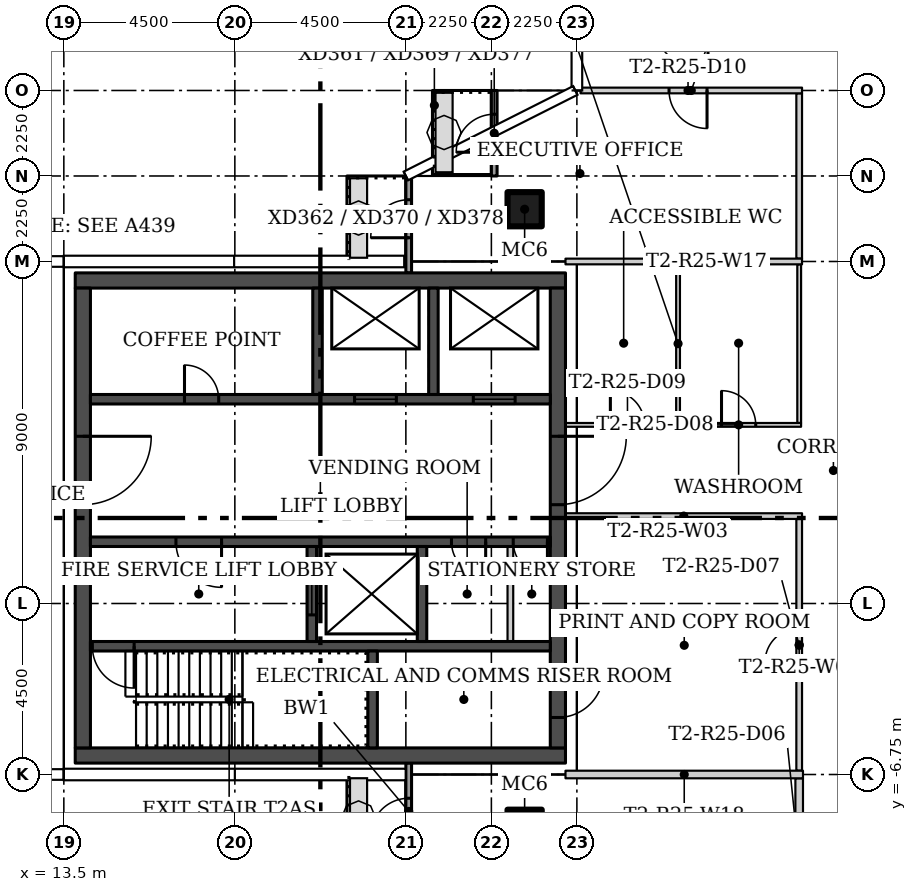
"""IFC4 building model, lengths in metres.
Left out: names, types, materials, properties, quantities, classifications, styles, units other than length and angle.
Written with IfcOpenShell. Run it as: python <this file> out.ifc"""

import sys

from ifc_helpers import new_model, si_unit, direction, frame, frame_2d, origin, origin_2d, place, context, subcontext, project, spatial, rectangle, hollow_rectangle, extrude, element, fill, save


model = new_model("IFC4")
c1 = context("Model", 3, precision=1e-05, world=origin(), true_north=direction((0.0, 1.0)))
c2 = subcontext(c1, "Body", "Model", "MODEL_VIEW")
j1 = project(units=[si_unit("LENGTHUNIT", "METRE"), si_unit("PLANEANGLEUNIT", "RADIAN")], contexts=[c1])
p1 = place(None, origin())
s1 = spatial("IfcSite", under=j1, at=p1, CompositionType="ELEMENT")
p2 = place(p1, origin())
s2 = spatial("IfcBuilding", under=s1, at=p2, CompositionType="ELEMENT")
p3 = place(p2, frame((0.0, 0.0, 230.4)))
s3 = spatial("IfcBuildingStorey", under=s2, at=p3, CompositionType="ELEMENT", Elevation=230.4)
for number, where in (
    (1, (25.625, 8.125, 0.0)),
    (2, (25.625, -8.125, 0.0)),
):
    element("IfcColumn", number, at=place(p3, frame(where)), inside=s3, PredefinedType="COLUMN", context=c2, shape_type="SweptSolid", body=[
        extrude(hollow_rectangle(XDim=0.9, YDim=0.9, WallThickness=0.036, at=origin_2d()), origin(), (0.0, 0.0, 1.0), 3.55),
    ])
p4 = place(p3, frame((32.85, 2.5, 0.0), z_axis=(0.0, 0.0, 1.0), x_axis=(0.0, 1.0, 0.0)))
e3 = element("IfcWall", 3, at=p4, inside=s3, PredefinedType="PARTITIONING", context=c2, shape_type="SweptSolid", body=[
    extrude(rectangle(XDim=4.175, YDim=0.1, at=frame_2d((2.087, 0.0))), origin(), (0.0, 0.0, 1.0), 3.55),
])
p5 = place(p3, frame((26.7, 2.45, 0.0)))
e4 = element("IfcWall", 4, at=p5, inside=s3, PredefinedType="PARTITIONING", context=c2, shape_type="SweptSolid", body=[
    extrude(rectangle(XDim=6.2, YDim=0.1, at=frame_2d((3.1, 0.0))), origin(), (0.0, 0.0, 1.0), 3.55),
])
p6 = place(p5, frame((4.106, 0.0, 0.0)))
e5 = element("IfcOpeningElement", 5, at=p6, cuts=e4, PredefinedType="OPENING", context=c2, shape_type="SweptSolid", body=[
    extrude(rectangle(XDim=0.9, YDim=2.1, at=frame_2d((0.45, 1.05))), frame((0.0, 0.06, 0.0), z_axis=(0.0, -1.0, 0.0), x_axis=(1.0, 0.0, 0.0)), (0.0, 0.0, 1.0), 0.12),
])
p7 = place(p5, frame((1.181, 0.0, 0.0)))
e6 = element("IfcOpeningElement", 6, at=p7, cuts=e4, PredefinedType="OPENING", context=c2, shape_type="SweptSolid", body=[
    extrude(rectangle(XDim=0.9, YDim=2.1, at=frame_2d((0.45, 1.05))), frame((0.0, 0.06, 0.0), z_axis=(0.0, -1.0, 0.0), x_axis=(1.0, 0.0, 0.0)), (0.0, 0.0, 1.0), 0.12),
])
p8 = place(p3, frame((32.925, 0.05, 0.0), z_axis=(0.0, 0.0, 1.0), x_axis=(-1.0, 0.0, 0.0)))
e7 = element("IfcWall", 7, at=p8, inside=s3, PredefinedType="PARTITIONING", context=c2, shape_type="SweptSolid", body=[
    extrude(rectangle(XDim=6.225, YDim=0.15, at=frame_2d((3.112, 0.0))), origin(), (0.0, 0.0, 1.0), 3.55),
])
p9 = place(p3, frame((32.85, 6.825, 0.0), z_axis=(0.0, 0.0, 1.0), x_axis=(0.0, 1.0, 0.0)))
e8 = element("IfcWall", 8, at=p9, inside=s3, PredefinedType="PARTITIONING", context=c2, shape_type="SweptSolid", body=[
    extrude(rectangle(XDim=4.35, YDim=0.15, at=frame_2d((2.175, 0.0))), origin(), (0.0, 0.0, 1.0), 3.55),
])
p10 = place(p3, frame((32.85, -6.65, 0.0), z_axis=(0.0, 0.0, 1.0), x_axis=(0.0, 1.0, 0.0)))
e9 = element("IfcWall", 9, at=p10, inside=s3, PredefinedType="PARTITIONING", context=c2, shape_type="SweptSolid", body=[
    extrude(rectangle(XDim=6.625, YDim=0.15, at=frame_2d((3.312, 0.0))), origin(), (0.0, 0.0, 1.0), 3.55),
])
p11 = place(p10, frame((2.85, 0.0, 0.0)))
e10 = element("IfcOpeningElement", 10, at=p11, cuts=e9, PredefinedType="OPENING", context=c2, shape_type="SweptSolid", body=[
    extrude(rectangle(XDim=0.9, YDim=2.1, at=frame_2d((0.45, 1.05))), frame((0.0, 0.085, 0.0), z_axis=(0.0, -1.0, 0.0), x_axis=(1.0, 0.0, 0.0)), (0.0, 0.0, 1.0), 0.17),
])
p12 = place(p3, frame((32.925, 11.25, 0.0), z_axis=(0.0, 0.0, 1.0), x_axis=(-1.0, 0.0, 0.0)))
e11 = element("IfcWall", 11, at=p12, inside=s3, PredefinedType="PARTITIONING", context=c2, shape_type="SweptSolid", body=[
    extrude(rectangle(XDim=5.83, YDim=0.15, at=frame_2d((2.915, 0.0))), origin(), (0.0, 0.0, 1.0), 3.55),
])
p13 = place(p12, frame((2.5, 0.0, 0.0)))
e12 = element("IfcOpeningElement", 12, at=p13, cuts=e11, PredefinedType="OPENING", context=c2, shape_type="SweptSolid", body=[
    extrude(rectangle(XDim=1.0, YDim=2.4, at=frame_2d((0.5, 1.2))), frame((0.0, 0.085, 0.0), z_axis=(0.0, -1.0, 0.0), x_axis=(1.0, 0.0, 0.0)), (0.0, 0.0, 1.0), 0.17),
])
p14 = place(p3, frame((32.85, -11.15, 0.0), z_axis=(0.0, 0.0, 1.0), x_axis=(0.0, 1.0, 0.0)))
e13 = element("IfcWall", 13, at=p14, inside=s3, PredefinedType="PARTITIONING", context=c2, shape_type="SweptSolid", body=[
    extrude(rectangle(XDim=4.3, YDim=0.2, at=frame_2d((2.15, 0.0))), origin(), (0.0, 0.0, 1.0), 3.55),
])
p15 = place(p14, frame((1.4, 0.0, 0.0)))
e14 = element("IfcOpeningElement", 14, at=p15, cuts=e13, PredefinedType="OPENING", context=c2, shape_type="SweptSolid", body=[
    extrude(rectangle(XDim=1.5, YDim=2.4, at=frame_2d((0.75, 1.2))), frame((0.0, 0.11, 0.0), z_axis=(0.0, -1.0, 0.0), x_axis=(1.0, 0.0, 0.0)), (0.0, 0.0, 1.0), 0.22),
])
p16 = place(p3, frame((29.662, 6.675, 0.0), z_axis=(0.0, 0.0, 1.0), x_axis=(0.0, -1.0, 0.0)))
e15 = element("IfcWall", 15, at=p16, inside=s3, PredefinedType="PARTITIONING", context=c2, shape_type="SweptSolid", body=[
    extrude(rectangle(XDim=4.175, YDim=0.1, at=frame_2d((2.087, 0.0))), origin(), (0.0, 0.0, 1.0), 3.55),
])
p17 = place(p3, frame((32.925, 6.75, 0.0), z_axis=(0.0, 0.0, 1.0), x_axis=(-1.0, 0.0, 0.0)))
e16 = element("IfcWall", 16, at=p17, inside=s3, PredefinedType="PARTITIONING", context=c2, shape_type="SweptSolid", body=[
    extrude(rectangle(XDim=6.225, YDim=0.15, at=frame_2d((3.112, 0.0))), origin(), (0.0, 0.0, 1.0), 3.55),
])
p18 = place(p3, frame((26.7, -6.75, 0.0)))
e17 = element("IfcWall", 17, at=p18, inside=s3, PredefinedType="PARTITIONING", context=c2, shape_type="SweptSolid", body=[
    extrude(rectangle(XDim=6.25, YDim=0.2, at=frame_2d((3.125, 0.0))), origin(), (0.0, 0.0, 1.0), 3.55),
])
p19 = place(p3, frame((24.825, 9.0, 0.0), z_axis=(0.0, 0.0, 1.0), x_axis=(0.0, 1.0, 0.0)))
e18 = element("IfcWall", 18, at=p19, inside=s3, PredefinedType="SOLIDWALL", context=c2, shape_type="SweptSolid", body=[
    extrude(rectangle(XDim=2.25, YDim=0.15, at=frame_2d((1.125, 0.0))), origin(), (0.0, 0.0, 1.0), 3.45),
])
p20 = place(p19, frame((0.625, 0.0, 0.0)))
e19 = element("IfcOpeningElement", 19, at=p20, cuts=e18, PredefinedType="OPENING", context=c2, shape_type="SweptSolid", body=[
    extrude(rectangle(XDim=1.0, YDim=2.4, at=frame_2d((0.5, 1.2))), frame((0.0, 0.085, 0.0), z_axis=(0.0, -1.0, 0.0), x_axis=(1.0, 0.0, 0.0)), (0.0, 0.0, 1.0), 0.17),
])
p21 = place(p3, frame((22.575, 6.448, 0.0), z_axis=(0.0, 0.0, 1.0), x_axis=(0.0, 1.0, 0.0)))
e20 = element("IfcWall", 20, at=p21, inside=s3, PredefinedType="SOLIDWALL", context=c2, shape_type="SweptSolid", body=[
    extrude(rectangle(XDim=2.552, YDim=0.15, at=frame_2d((1.276, 0.0))), origin(), (0.0, 0.0, 1.0), 3.45),
])
p22 = place(p21, frame((0.927, 0.0, 0.0)))
e21 = element("IfcOpeningElement", 21, at=p22, cuts=e20, PredefinedType="OPENING", context=c2, shape_type="SweptSolid", body=[
    extrude(rectangle(XDim=1.0, YDim=2.4, at=frame_2d((0.5, 1.2))), frame((0.0, 0.085, 0.0), z_axis=(0.0, -1.0, 0.0), x_axis=(1.0, 0.0, 0.0)), (0.0, 0.0, 1.0), 0.17),
])
p23 = place(p3, frame((22.575, -9.0, 0.0), z_axis=(0.0, 0.0, 1.0), x_axis=(0.0, 1.0, 0.0)))
e22 = element("IfcWall", 22, at=p23, inside=s3, PredefinedType="SOLIDWALL", context=c2, shape_type="SweptSolid", body=[
    extrude(rectangle(XDim=2.557, YDim=0.15, at=frame_2d((1.278, 0.0))), origin(), (0.0, 0.0, 1.0), 3.45),
])
p24 = place(p23, frame((0.625, 0.0, 0.0)))
e23 = element("IfcOpeningElement", 23, at=p24, cuts=e22, PredefinedType="OPENING", context=c2, shape_type="SweptSolid", body=[
    extrude(rectangle(XDim=1.0, YDim=2.4, at=frame_2d((0.5, 1.2))), frame((0.0, 0.085, 0.0), z_axis=(0.0, -1.0, 0.0), x_axis=(1.0, 0.0, 0.0)), (0.0, 0.0, 1.0), 0.17),
])
for number, where in (
    (24, (13.8, -6.25, 0.0)),
    (25, (13.8, 6.25, 0.0)),
):
    element("IfcWall", number, at=place(p3, frame(where)), inside=s3, PredefinedType="SHEAR", context=c2, shape_type="SweptSolid", body=[
        extrude(rectangle(XDim=12.9, YDim=0.4, at=frame_2d((6.45, 0.0))), origin(), (0.0, 0.0, 1.0), 3.55),
    ])
p25 = place(p3, frame((14.0, 6.05, 0.0), z_axis=(0.0, 0.0, 1.0), x_axis=(0.0, -1.0, 0.0)))
e26 = element("IfcWall", 26, at=p25, inside=s3, PredefinedType="SHEAR", context=c2, shape_type="SweptSolid", body=[
    extrude(rectangle(XDim=12.1, YDim=0.4, at=frame_2d((6.05, 0.0))), origin(), (0.0, 0.0, 1.0), 3.55),
])
p26 = place(p25, frame((3.9, 0.0, 0.0)))
e27 = element("IfcOpeningElement", 27, at=p26, cuts=e26, PredefinedType="OPENING", context=c2, shape_type="SweptSolid", body=[
    extrude(rectangle(XDim=1.8, YDim=2.4, at=frame_2d((0.9, 1.2))), frame((0.0, 0.21, 0.0), z_axis=(0.0, -1.0, 0.0), x_axis=(1.0, 0.0, 0.0)), (0.0, 0.0, 1.0), 0.42),
])
p27 = place(p3, frame((26.5, 6.05, 0.0), z_axis=(0.0, 0.0, 1.0), x_axis=(0.0, -1.0, 0.0)))
e28 = element("IfcWall", 28, at=p27, inside=s3, PredefinedType="SHEAR", context=c2, shape_type="SweptSolid", body=[
    extrude(rectangle(XDim=12.1, YDim=0.4, at=frame_2d((6.05, 0.0))), origin(), (0.0, 0.0, 1.0), 3.55),
])
p28 = place(p27, frame((10.1, 0.0, 0.0)))
e29 = element("IfcOpeningElement", 29, at=p28, cuts=e28, PredefinedType="OPENING", context=c2, shape_type="SweptSolid", body=[
    extrude(rectangle(XDim=1.2, YDim=2.1, at=frame_2d((0.6, 1.05))), frame((0.0, 0.21, 0.0), z_axis=(0.0, -1.0, 0.0), x_axis=(1.0, 0.0, 0.0)), (0.0, 0.0, 1.0), 0.42),
])
p29 = place(p27, frame((3.9, 0.0, 0.0)))
e30 = element("IfcOpeningElement", 30, at=p29, cuts=e28, PredefinedType="OPENING", context=c2, shape_type="SweptSolid", body=[
    extrude(rectangle(XDim=1.8, YDim=2.4, at=frame_2d((0.9, 1.2))), frame((0.0, 0.21, 0.0), z_axis=(0.0, -1.0, 0.0), x_axis=(1.0, 0.0, 0.0)), (0.0, 0.0, 1.0), 0.42),
])
p30 = place(p3, frame((26.3, -3.375, 0.0), z_axis=(0.0, 0.0, 1.0), x_axis=(-1.0, 0.0, 0.0)))
e31 = element("IfcWall", 31, at=p30, inside=s3, PredefinedType="SHEAR", context=c2, shape_type="SweptSolid", body=[
    extrude(rectangle(XDim=12.1, YDim=0.25, at=frame_2d((6.05, 0.0))), origin(), (0.0, 0.0, 1.0), 3.55),
])
p31 = place(p30, frame((10.95, 0.0, 0.0)))
e32 = element("IfcOpeningElement", 32, at=p31, cuts=e31, PredefinedType="OPENING", context=c2, shape_type="SweptSolid", body=[
    extrude(rectangle(XDim=1.1, YDim=2.1, at=frame_2d((0.55, 1.05))), frame((0.0, 0.135, 0.0), z_axis=(0.0, -1.0, 0.0), x_axis=(1.0, 0.0, 0.0)), (0.0, 0.0, 1.0), 0.27),
])
p32 = place(p3, frame((21.625, -6.05, 0.0), z_axis=(0.0, 0.0, 1.0), x_axis=(0.0, 1.0, 0.0)))
e33 = element("IfcWall", 33, at=p32, inside=s3, PredefinedType="SHEAR", context=c2, shape_type="SweptSolid", body=[
    extrude(rectangle(XDim=2.55, YDim=0.25, at=frame_2d((1.275, 0.0))), origin(), (0.0, 0.0, 1.0), 3.55),
])
p33 = place(p3, frame((26.3, -0.625, 0.0), z_axis=(0.0, 0.0, 1.0), x_axis=(-1.0, 0.0, 0.0)))
e34 = element("IfcWall", 34, at=p33, inside=s3, PredefinedType="SHEAR", context=c2, shape_type="SweptSolid", body=[
    extrude(rectangle(XDim=12.1, YDim=0.25, at=frame_2d((6.05, 0.0))), origin(), (0.0, 0.0, 1.0), 3.55),
])
p34 = place(p33, frame((8.65, 0.0, 0.0)))
e35 = element("IfcOpeningElement", 35, at=p34, cuts=e34, PredefinedType="OPENING", context=c2, shape_type="SweptSolid", body=[
    extrude(rectangle(XDim=1.2, YDim=2.1, at=frame_2d((0.6, 1.05))), frame((0.0, 0.135, 0.0), z_axis=(0.0, -1.0, 0.0), x_axis=(1.0, 0.0, 0.0)), (0.0, 0.0, 1.0), 0.27),
])
p35 = place(p33, frame((1.7, 0.0, 0.0)))
e36 = element("IfcOpeningElement", 36, at=p35, cuts=e34, PredefinedType="OPENING", context=c2, shape_type="SweptSolid", body=[
    extrude(rectangle(XDim=0.9, YDim=2.1, at=frame_2d((0.45, 1.05))), frame((0.0, 0.135, 0.0), z_axis=(0.0, -1.0, 0.0), x_axis=(1.0, 0.0, 0.0)), (0.0, 0.0, 1.0), 0.27),
])
p36 = place(p33, frame((0.075, 0.0, 0.0)))
e37 = element("IfcOpeningElement", 37, at=p36, cuts=e34, PredefinedType="OPENING", context=c2, shape_type="SweptSolid", body=[
    extrude(rectangle(XDim=0.9, YDim=2.1, at=frame_2d((0.45, 1.05))), frame((0.0, 0.135, 0.0), z_axis=(0.0, -1.0, 0.0), x_axis=(1.0, 0.0, 0.0)), (0.0, 0.0, 1.0), 0.27),
])
p37 = place(p3, frame((20.025, -3.25, 0.0), z_axis=(0.0, 0.0, 1.0), x_axis=(0.0, 1.0, 0.0)))
e38 = element("IfcWall", 38, at=p37, inside=s3, PredefinedType="SHEAR", context=c2, shape_type="SweptSolid", body=[
    extrude(rectangle(XDim=2.5, YDim=0.25, at=frame_2d((1.25, 0.0))), origin(), (0.0, 0.0, 1.0), 3.55),
])
p38 = place(p37, frame((0.7, 0.0, 0.0)))
e39 = element("IfcOpeningElement", 39, at=p38, cuts=e38, PredefinedType="OPENING", context=c2, shape_type="SweptSolid", body=[
    extrude(rectangle(XDim=1.1, YDim=2.1, at=frame_2d((0.55, 1.05))), frame((0.0, 0.135, 0.0), z_axis=(0.0, -1.0, 0.0), x_axis=(1.0, 0.0, 0.0)), (0.0, 0.0, 1.0), 0.27),
])
p39 = place(p3, frame((22.925, -3.25, 0.0), z_axis=(0.0, 0.0, 1.0), x_axis=(0.0, 1.0, 0.0)))
e40 = element("IfcWall", 40, at=p39, inside=s3, PredefinedType="SHEAR", context=c2, shape_type="SweptSolid", body=[
    extrude(rectangle(XDim=2.5, YDim=0.25, at=frame_2d((1.25, 0.0))), origin(), (0.0, 0.0, 1.0), 3.55),
])
p40 = place(p3, frame((25.25, -3.25, 0.0), z_axis=(0.0, 0.0, 1.0), x_axis=(0.0, 1.0, 0.0)))
e41 = element("IfcWall", 41, at=p40, inside=s3, PredefinedType="PARTITIONING", context=c2, shape_type="SweptSolid", body=[
    extrude(rectangle(XDim=2.5, YDim=0.15, at=frame_2d((1.25, 0.0))), origin(), (0.0, 0.0, 1.0), 3.55),
])
p41 = place(p3, frame((14.2, 3.125, 0.0)))
e42 = element("IfcWall", 42, at=p41, inside=s3, PredefinedType="SHEAR", context=c2, shape_type="SweptSolid", body=[
    extrude(rectangle(XDim=12.1, YDim=0.25, at=frame_2d((6.05, 0.0))), origin(), (0.0, 0.0, 1.0), 3.55),
])
p42 = place(p41, frame((6.95, 0.0, 0.0)))
e43 = element("IfcOpeningElement", 43, at=p42, cuts=e42, PredefinedType="OPENING", context=c2, shape_type="SweptSolid", body=[
    extrude(rectangle(XDim=1.1, YDim=2.1, at=frame_2d((0.55, 1.05))), frame((0.0, 0.135, 0.0), z_axis=(0.0, -1.0, 0.0), x_axis=(1.0, 0.0, 0.0)), (0.0, 0.0, 1.0), 0.27),
])
p43 = place(p41, frame((10.075, 0.0, 0.0)))
e44 = element("IfcOpeningElement", 44, at=p43, cuts=e42, PredefinedType="OPENING", context=c2, shape_type="SweptSolid", body=[
    extrude(rectangle(XDim=1.1, YDim=2.1, at=frame_2d((0.55, 1.05))), frame((0.0, 0.135, 0.0), z_axis=(0.0, -1.0, 0.0), x_axis=(1.0, 0.0, 0.0)), (0.0, 0.0, 1.0), 0.27),
])
p44 = place(p41, frame((2.475, 0.0, 0.0)))
e45 = element("IfcOpeningElement", 45, at=p44, cuts=e42, PredefinedType="OPENING", context=c2, shape_type="SweptSolid", body=[
    extrude(rectangle(XDim=0.9, YDim=2.1, at=frame_2d((0.45, 1.05))), frame((0.0, 0.135, 0.0), z_axis=(0.0, -1.0, 0.0), x_axis=(1.0, 0.0, 0.0)), (0.0, 0.0, 1.0), 0.27),
])
for number, where, z_axis, x_axis in (
    (46, (20.175, 3.25, 0.0), (0.0, 0.0, 1.0), (0.0, 1.0, 0.0)),
    (47, (23.225, 3.25, 0.0), (0.0, 0.0, 1.0), (0.0, 1.0, 0.0)),
):
    element("IfcWall", number, at=place(p3, frame(where, z_axis=z_axis, x_axis=x_axis)), inside=s3, PredefinedType="SHEAR", context=c2, shape_type="SweptSolid", body=[
        extrude(rectangle(XDim=2.8, YDim=0.25, at=frame_2d((1.4, 0.0))), origin(), (0.0, 0.0, 1.0), 3.55),
    ])
p45 = place(p11, origin())
e48 = element("IfcDoor", 48, at=p45, inside=s3, OperationType="SINGLE_SWING_RIGHT", PredefinedType="DOOR", context=c2, shape_type="SweptSolid", body=[
    extrude(rectangle(XDim=0.9, YDim=2.1, at=frame_2d((0.45, 1.05))), frame((0.0, 0.025, 0.0), z_axis=(0.0, -1.0, 0.0), x_axis=(1.0, 0.0, 0.0)), (0.0, 0.0, 1.0), 0.05),
])
fill(e10, e48)
p46 = place(p6, origin())
e49 = element("IfcDoor", 49, at=p46, inside=s3, OperationType="SINGLE_SWING_RIGHT", PredefinedType="DOOR", context=c2, shape_type="SweptSolid", body=[
    extrude(rectangle(XDim=0.9, YDim=2.1, at=frame_2d((0.45, 1.05))), frame((0.0, 0.025, 0.0), z_axis=(0.0, -1.0, 0.0), x_axis=(1.0, 0.0, 0.0)), (0.0, 0.0, 1.0), 0.05),
])
fill(e5, e49)
p47 = place(p7, origin())
e50 = element("IfcDoor", 50, at=p47, inside=s3, OperationType="SINGLE_SWING_RIGHT", PredefinedType="DOOR", context=c2, shape_type="SweptSolid", body=[
    extrude(rectangle(XDim=0.9, YDim=2.1, at=frame_2d((0.45, 1.05))), frame((0.0, 0.025, 0.0), z_axis=(0.0, -1.0, 0.0), x_axis=(1.0, 0.0, 0.0)), (0.0, 0.0, 1.0), 0.05),
])
fill(e6, e50)
p48 = place(p13, origin())
e51 = element("IfcDoor", 51, at=p48, inside=s3, OperationType="SINGLE_SWING_LEFT", PredefinedType="DOOR", context=c2, shape_type="SweptSolid", body=[
    extrude(rectangle(XDim=1.0, YDim=2.4, at=frame_2d((0.5, 1.2))), frame((0.0, 0.025, 0.0), z_axis=(0.0, -1.0, 0.0), x_axis=(1.0, 0.0, 0.0)), (0.0, 0.0, 1.0), 0.05),
])
fill(e12, e51)
p49 = place(p20, origin())
e52 = element("IfcDoor", 52, at=p49, inside=s3, OperationType="SINGLE_SWING_RIGHT", PredefinedType="DOOR", context=c2, shape_type="SweptSolid", body=[
    extrude(rectangle(XDim=1.0, YDim=2.4, at=frame_2d((0.5, 1.2))), frame((0.0, 0.025, 0.0), z_axis=(0.0, -1.0, 0.0), x_axis=(1.0, 0.0, 0.0)), (0.0, 0.0, 1.0), 0.05),
])
fill(e19, e52)
p50 = place(p22, origin())
e53 = element("IfcDoor", 53, at=p50, inside=s3, OperationType="SINGLE_SWING_LEFT", PredefinedType="DOOR", context=c2, shape_type="SweptSolid", body=[
    extrude(rectangle(XDim=1.0, YDim=2.4, at=frame_2d((0.5, 1.2))), frame((0.0, 0.025, 0.0), z_axis=(0.0, -1.0, 0.0), x_axis=(1.0, 0.0, 0.0)), (0.0, 0.0, 1.0), 0.05),
])
fill(e21, e53)
p51 = place(p24, origin())
e54 = element("IfcDoor", 54, at=p51, inside=s3, OperationType="SINGLE_SWING_LEFT", PredefinedType="DOOR", context=c2, shape_type="SweptSolid", body=[
    extrude(rectangle(XDim=1.0, YDim=2.4, at=frame_2d((0.5, 1.2))), frame((0.0, 0.025, 0.0), z_axis=(0.0, -1.0, 0.0), x_axis=(1.0, 0.0, 0.0)), (0.0, 0.0, 1.0), 0.05),
])
fill(e23, e54)
p52 = place(p26, origin())
e55 = element("IfcDoor", 55, at=p52, inside=s3, OperationType="DOUBLE_DOOR_SINGLE_SWING", PredefinedType="DOOR", context=c2, shape_type="SweptSolid", body=[
    extrude(rectangle(XDim=1.8, YDim=2.4, at=frame_2d((0.9, 1.2))), frame((0.0, 0.025, 0.0), z_axis=(0.0, -1.0, 0.0), x_axis=(1.0, 0.0, 0.0)), (0.0, 0.0, 1.0), 0.05),
])
fill(e27, e55)
p53 = place(p28, origin())
e56 = element("IfcDoor", 56, at=p53, inside=s3, OperationType="SINGLE_SWING_RIGHT", PredefinedType="DOOR", context=c2, shape_type="SweptSolid", body=[
    extrude(rectangle(XDim=1.2, YDim=2.1, at=frame_2d((0.6, 1.05))), frame((0.0, 0.025, 0.0), z_axis=(0.0, -1.0, 0.0), x_axis=(1.0, 0.0, 0.0)), (0.0, 0.0, 1.0), 0.05),
])
fill(e29, e56)
p54 = place(p29, origin())
e57 = element("IfcDoor", 57, at=p54, inside=s3, OperationType="DOUBLE_DOOR_SINGLE_SWING", PredefinedType="DOOR", context=c2, shape_type="SweptSolid", body=[
    extrude(rectangle(XDim=1.8, YDim=2.4, at=frame_2d((0.9, 1.2))), frame((0.0, 0.025, 0.0), z_axis=(0.0, -1.0, 0.0), x_axis=(1.0, 0.0, 0.0)), (0.0, 0.0, 1.0), 0.05),
])
fill(e30, e57)
p55 = place(p31, origin())
e58 = element("IfcDoor", 58, at=p55, inside=s3, OperationType="SINGLE_SWING_RIGHT", PredefinedType="DOOR", context=c2, shape_type="SweptSolid", body=[
    extrude(rectangle(XDim=1.1, YDim=2.1, at=frame_2d((0.55, 1.05))), frame((0.0, 0.025, 0.0), z_axis=(0.0, -1.0, 0.0), x_axis=(1.0, 0.0, 0.0)), (0.0, 0.0, 1.0), 0.05),
])
fill(e32, e58)
p56 = place(p34, origin())
e59 = element("IfcDoor", 59, at=p56, inside=s3, OperationType="SINGLE_SWING_RIGHT", PredefinedType="DOOR", context=c2, shape_type="SweptSolid", body=[
    extrude(rectangle(XDim=1.2, YDim=2.1, at=frame_2d((0.6, 1.05))), frame((0.0, 0.025, 0.0), z_axis=(0.0, -1.0, 0.0), x_axis=(1.0, 0.0, 0.0)), (0.0, 0.0, 1.0), 0.05),
])
fill(e35, e59)
p57 = place(p35, origin())
e60 = element("IfcDoor", 60, at=p57, inside=s3, OperationType="SINGLE_SWING_LEFT", PredefinedType="DOOR", context=c2, shape_type="SweptSolid", body=[
    extrude(rectangle(XDim=0.9, YDim=2.1, at=frame_2d((0.45, 1.05))), frame((0.0, 0.025, 0.0), z_axis=(0.0, -1.0, 0.0), x_axis=(1.0, 0.0, 0.0)), (0.0, 0.0, 1.0), 0.05),
])
fill(e36, e60)
p58 = place(p36, origin())
e61 = element("IfcDoor", 61, at=p58, inside=s3, OperationType="SINGLE_SWING_LEFT", PredefinedType="DOOR", context=c2, shape_type="SweptSolid", body=[
    extrude(rectangle(XDim=0.9, YDim=2.1, at=frame_2d((0.45, 1.05))), frame((0.0, 0.025, 0.0), z_axis=(0.0, -1.0, 0.0), x_axis=(1.0, 0.0, 0.0)), (0.0, 0.0, 1.0), 0.05),
])
fill(e37, e61)
p59 = place(p38, origin())
e62 = element("IfcDoor", 62, at=p59, inside=s3, OperationType="SLIDING_TO_LEFT", PredefinedType="DOOR", context=c2, shape_type="SweptSolid", body=[
    extrude(rectangle(XDim=1.1, YDim=2.1, at=frame_2d((0.55, 1.05))), frame((0.0, 0.025, 0.0), z_axis=(0.0, -1.0, 0.0), x_axis=(1.0, 0.0, 0.0)), (0.0, 0.0, 1.0), 0.05),
])
fill(e39, e62)
p60 = place(p42, origin())
e63 = element("IfcDoor", 63, at=p60, inside=s3, OperationType="SLIDING_TO_LEFT", PredefinedType="DOOR", context=c2, shape_type="SweptSolid", body=[
    extrude(rectangle(XDim=1.1, YDim=2.1, at=frame_2d((0.55, 1.05))), frame((0.0, 0.025, 0.0), z_axis=(0.0, -1.0, 0.0), x_axis=(1.0, 0.0, 0.0)), (0.0, 0.0, 1.0), 0.05),
])
fill(e43, e63)
p61 = place(p43, origin())
e64 = element("IfcDoor", 64, at=p61, inside=s3, OperationType="SLIDING_TO_LEFT", PredefinedType="DOOR", context=c2, shape_type="SweptSolid", body=[
    extrude(rectangle(XDim=1.1, YDim=2.1, at=frame_2d((0.55, 1.05))), frame((0.0, 0.025, 0.0), z_axis=(0.0, -1.0, 0.0), x_axis=(1.0, 0.0, 0.0)), (0.0, 0.0, 1.0), 0.05),
])
fill(e44, e64)
p62 = place(p44, origin())
e65 = element("IfcDoor", 65, at=p62, inside=s3, OperationType="SINGLE_SWING_LEFT", PredefinedType="DOOR", context=c2, shape_type="SweptSolid", body=[
    extrude(rectangle(XDim=0.9, YDim=2.1, at=frame_2d((0.45, 1.05))), frame((0.0, 0.025, 0.0), z_axis=(0.0, -1.0, 0.0), x_axis=(1.0, 0.0, 0.0)), (0.0, 0.0, 1.0), 0.05),
])
fill(e45, e65)
save(model, sys.argv[1])
